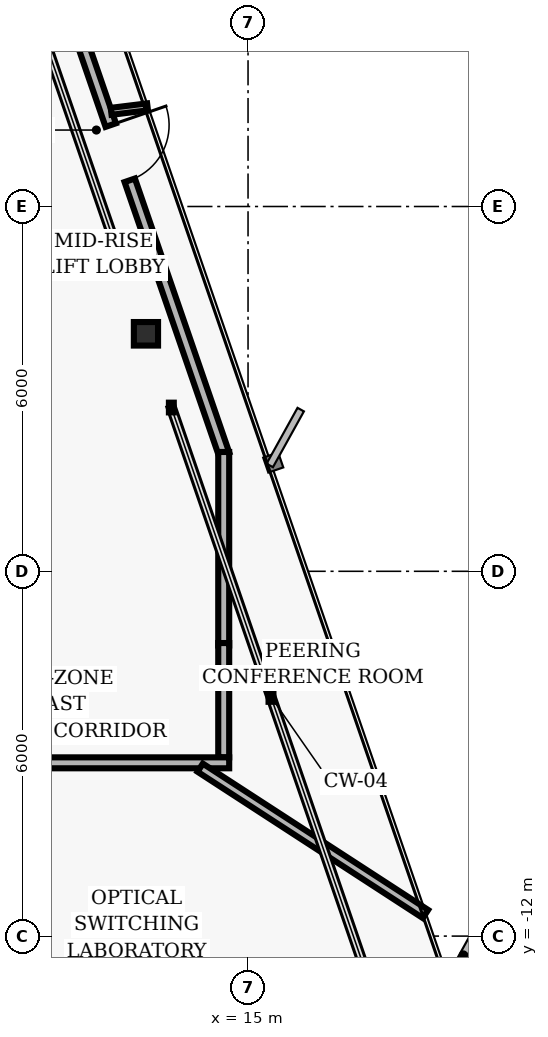
"""IFC4 building model, lengths in metres.
Left out: names, types, materials, properties, quantities, classifications, styles, units other than length and angle.
Written with IfcOpenShell. Run it as: python <this file> out.ifc"""

import sys

from ifc_helpers import new_model, si_unit, direction, frame, frame_2d, origin, origin_2d, place, context, subcontext, project, spatial, rectangle, i_section, extrude, element, fill, save


model = new_model("IFC4")
c1 = context("Model", 3, precision=1e-05, world=origin(), true_north=direction((0.0, 1.0)))
c2 = subcontext(c1, "Body", "Model", "MODEL_VIEW")
j1 = project(units=[si_unit("LENGTHUNIT", "METRE"), si_unit("PLANEANGLEUNIT", "RADIAN")], contexts=[c1])
p1 = place(None, origin())
s1 = spatial("IfcSite", under=j1, at=p1, CompositionType="ELEMENT")
p2 = place(p1, origin())
s2 = spatial("IfcBuilding", under=s1, at=p2, CompositionType="ELEMENT")
p3 = place(p2, frame((0.0, 0.0, 159.36)))
s3 = spatial("IfcBuildingStorey", under=s2, at=p3, CompositionType="ELEMENT", Elevation=159.36)
p4 = place(p3, frame((13.321, -2.094, 0.0), z_axis=(0.0, 0.0, 1.0), x_axis=(1.0, 0.0, 0.0)))
e1 = element("IfcColumn", 1, at=p4, inside=s3, PredefinedType="COLUMN", context=c2, shape_type="SweptSolid", body=[
    extrude(i_section(OverallWidth=0.398, OverallDepth=0.387, WebThickness=0.021, FlangeThickness=0.033, FilletRadius=0.018, at=origin_2d()), origin(), (0.0, 0.0, 1.0), 3.04),
])
p5 = place(p3, frame((10.954, 6.533, 0.0), z_axis=(0.0, 0.0, 1.0), x_axis=(0.325553439946, -0.945523642084, 0.0)))
e2 = element("IfcWall", 2, at=p5, inside=s3, PredefinedType="PARTITIONING", context=c2, shape_type="SweptSolid", body=[
    extrude(rectangle(XDim=11.22, YDim=0.18, at=frame_2d((5.61, 0.0))), origin(), (0.0, 0.0, 1.0), 2.763),
])
p6 = place(p5, frame((5.493, 0.0, 0.0)))
e3 = element("IfcOpeningElement", 3, at=p6, cuts=e2, PredefinedType="OPENING", context=c2, shape_type="SweptSolid", body=[
    extrude(rectangle(XDim=0.96, YDim=2.02, at=frame_2d((0.48, 1.01))), frame((0.0, 0.1, 0.0), z_axis=(0.0, -1.0, 0.0), x_axis=(1.0, 0.0, 0.0)), (0.0, 0.0, 1.0), 0.2),
])
p7 = place(p5, frame((2.621, 0.0, 0.0)))
e4 = element("IfcOpeningElement", 4, at=p7, cuts=e2, PredefinedType="OPENING", context=c2, shape_type="SweptSolid", body=[
    extrude(rectangle(XDim=0.96, YDim=2.02, at=frame_2d((0.48, 1.01))), frame((0.0, 0.1, 0.0), z_axis=(0.0, -1.0, 0.0), x_axis=(1.0, 0.0, 0.0)), (0.0, 0.0, 1.0), 0.2),
])
p8 = place(p3, frame((14.6, -4.038, 0.0), z_axis=(0.0, 0.0, 1.0), x_axis=(0.0, -1.0, 0.0)))
e5 = element("IfcWall", 5, at=p8, inside=s3, PredefinedType="PARTITIONING", context=c2, shape_type="SweptSolid", body=[
    extrude(rectangle(XDim=3.182, YDim=0.18, at=frame_2d((1.591, 0.0))), origin(), (0.0, 0.0, 1.0), 2.763),
])
p9 = place(p3, frame((14.6, -7.18, 0.0), z_axis=(0.0, 0.0, 1.0), x_axis=(0.0, -1.0, 0.0)))
e6 = element("IfcWall", 6, at=p9, inside=s3, PredefinedType="PARTITIONING", context=c2, shape_type="SweptSolid", body=[
    extrude(rectangle(XDim=1.88, YDim=0.18, at=frame_2d((0.94, 0.0))), origin(), (0.0, 0.0, 1.0), 2.763),
])
p10 = place(p3, frame((14.69, -9.15, 0.0), z_axis=(0.0, 0.0, 1.0), x_axis=(-1.0, 0.0, 0.0)))
e7 = element("IfcWall", 7, at=p10, inside=s3, PredefinedType="PARTITIONING", context=c2, shape_type="SweptSolid", body=[
    extrude(rectangle(XDim=3.75, YDim=0.18, at=frame_2d((1.875, 0.0))), origin(), (0.0, 0.0, 1.0), 2.763),
])
p11 = place(p3, frame((14.213, -9.23, 0.0), z_axis=(0.0, 0.0, 1.0), x_axis=(0.83867205822, -0.544636740187, 0.0)))
e8 = element("IfcWall", 8, at=p11, inside=s3, PredefinedType="PARTITIONING", context=c2, shape_type="SweptSolid", body=[
    extrude(rectangle(XDim=4.418, YDim=0.16, at=frame_2d((2.209, 0.0))), origin(), (0.0, 0.0, 1.0), 2.763),
])
p12 = place(p3, frame((12.749, 1.565, 0.0), z_axis=(0.0, 0.0, 1.0), x_axis=(0.992500437265, 0.122241081588, 0.0)))
e9 = element("IfcWall", 9, at=p12, inside=s3, PredefinedType="MOVABLE", context=c2, shape_type="SweptSolid", body=[
    extrude(rectangle(XDim=0.603, YDim=0.115, at=frame_2d((0.302, 0.0))), origin(), (0.0, 0.0, 1.0), 2.763),
])
p13 = place(p6, origin())
e10 = element("IfcDoor", 10, at=p13, inside=s3, OperationType="SINGLE_SWING_LEFT", PredefinedType="DOOR", context=c2, shape_type="SweptSolid", body=[
    extrude(rectangle(XDim=0.96, YDim=2.02, at=frame_2d((0.48, 1.01))), frame((0.0, 0.025, 0.0), z_axis=(0.0, -1.0, 0.0), x_axis=(1.0, 0.0, 0.0)), (0.0, 0.0, 1.0), 0.05),
])
fill(e3, e10)
save(model, sys.argv[1])
